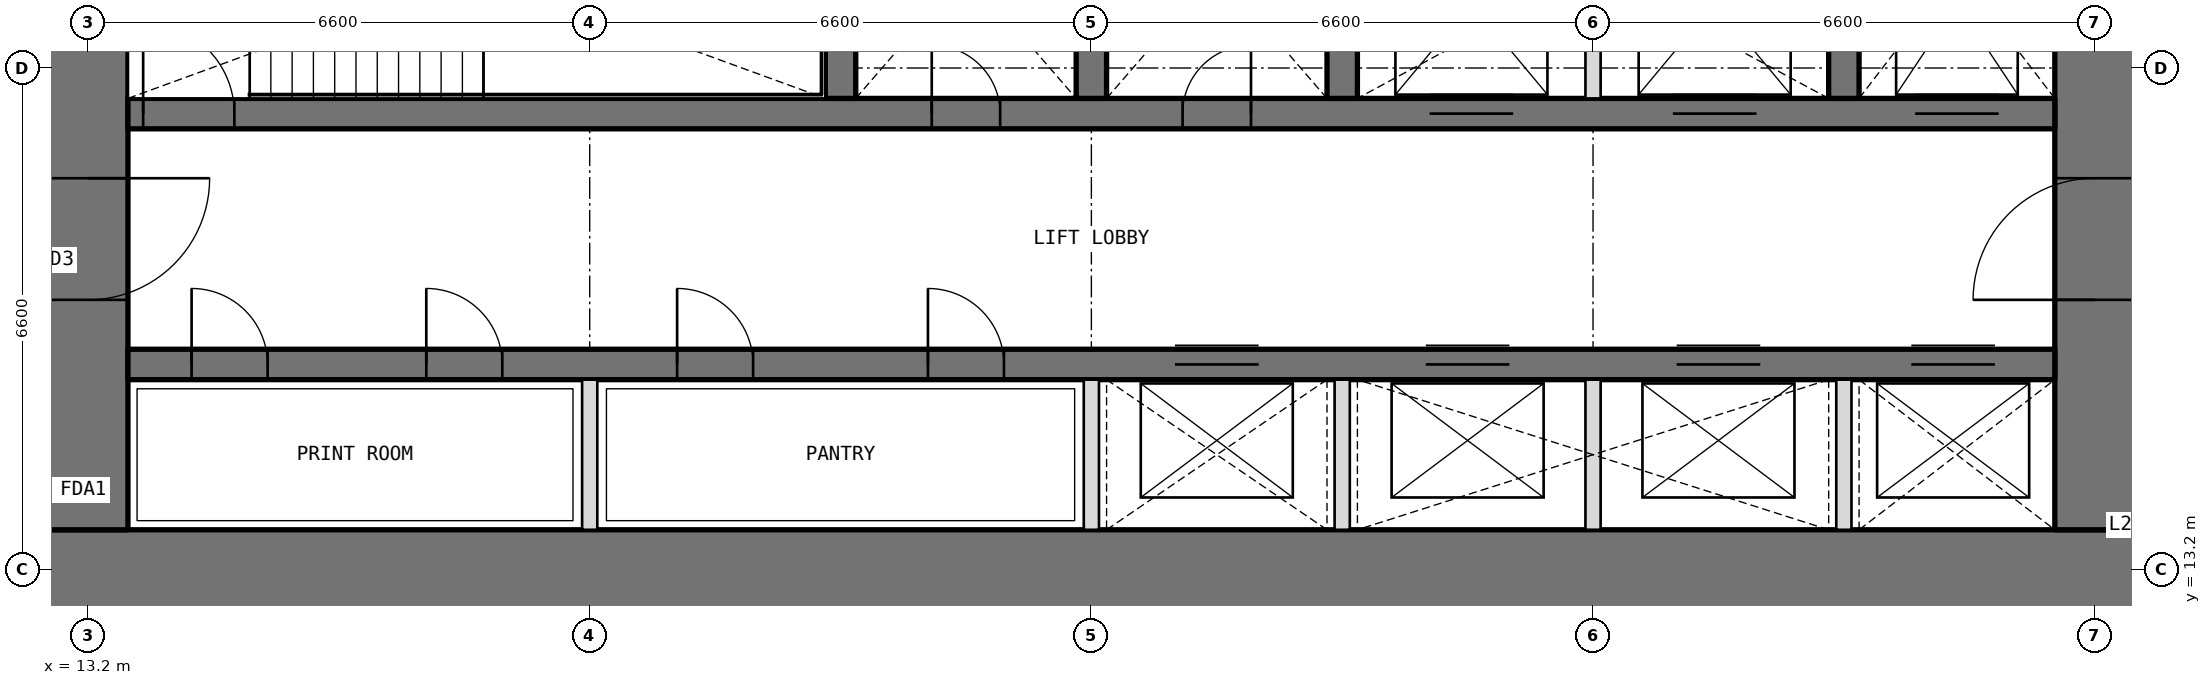
"""IFC4 building model, lengths in metres.
Left out: names, types, materials, properties, quantities, classifications, styles, units other than length and angle.
Written with IfcOpenShell. Run it as: python <this file> out.ifc"""

import sys

from ifc_helpers import new_model, si_unit, direction, frame, frame_2d, origin, place, context, subcontext, project, spatial, rectangle, extrude, element, fill, save


model = new_model("IFC4")
c1 = context("Model", 3, precision=1e-05, world=origin(), true_north=direction((0.0, 1.0)))
c2 = subcontext(c1, "Body", "Model", "MODEL_VIEW")
j1 = project(units=[si_unit("LENGTHUNIT", "METRE"), si_unit("PLANEANGLEUNIT", "RADIAN")], contexts=[c1])
p1 = place(None, origin())
s1 = spatial("IfcSite", under=j1, at=p1, CompositionType="ELEMENT")
p2 = place(p1, origin())
s2 = spatial("IfcBuilding", under=s1, at=p2, CompositionType="ELEMENT")
p3 = place(p2, frame((0.0, 0.0, 120.0)))
s3 = spatial("IfcBuildingStorey", under=s2, at=p3, CompositionType="ELEMENT", Elevation=120.0)
p4 = place(p3, frame((12.675, 13.2, 0.0), z_axis=(0.0, 0.0, 1.0), x_axis=(1.0, 0.0, 0.0)))
e1 = element("IfcWall", 1, at=p4, inside=s3, PredefinedType="SHEAR", context=c2, shape_type="SweptSolid", body=[
    extrude(rectangle(XDim=27.45, YDim=1.05, at=frame_2d((13.725, 0.0))), origin(), (0.0, 0.0, 1.0), 4.2),
])
p5 = place(p3, frame((39.6, 13.725, 0.0), z_axis=(0.0, 0.0, 1.0), x_axis=(0.0, 1.0, 0.0)))
e2 = element("IfcWall", 2, at=p5, inside=s3, PredefinedType="SHEAR", context=c2, shape_type="SweptSolid", body=[
    extrude(rectangle(XDim=18.75, YDim=1.05, at=frame_2d((9.375, 0.0))), origin(), (0.0, 0.0, 1.0), 4.2),
])
p6 = place(p5, frame((3.025, 0.0, 0.0)))
e3 = element("IfcOpeningElement", 3, at=p6, cuts=e2, PredefinedType="OPENING", context=c2, shape_type="SweptSolid", body=[
    extrude(rectangle(XDim=1.6, YDim=2.1, at=frame_2d((0.8, 1.05))), frame((0.0, 0.535, 0.0), z_axis=(0.0, -1.0, 0.0), x_axis=(1.0, 0.0, 0.0)), (0.0, 0.0, 1.0), 1.07),
])
p7 = place(p5, frame((13.825, 0.0, 0.0)))
e4 = element("IfcOpeningElement", 4, at=p7, cuts=e2, PredefinedType="OPENING", context=c2, shape_type="SweptSolid", body=[
    extrude(rectangle(XDim=1.6, YDim=2.1, at=frame_2d((0.8, 1.05))), frame((0.0, 0.535, 0.0), z_axis=(0.0, -1.0, 0.0), x_axis=(1.0, 0.0, 0.0)), (0.0, 0.0, 1.0), 1.07),
])
p8 = place(p3, frame((13.2, 32.475, 0.0), z_axis=(0.0, 0.0, 1.0), x_axis=(0.0, -1.0, 0.0)))
e5 = element("IfcWall", 5, at=p8, inside=s3, PredefinedType="SHEAR", context=c2, shape_type="SweptSolid", body=[
    extrude(rectangle(XDim=18.75, YDim=1.05, at=frame_2d((9.375, 0.0))), origin(), (0.0, 0.0, 1.0), 4.2),
])
p9 = place(p8, frame((14.125, 0.0, 0.0)))
e6 = element("IfcOpeningElement", 6, at=p9, cuts=e5, PredefinedType="OPENING", context=c2, shape_type="SweptSolid", body=[
    extrude(rectangle(XDim=1.6, YDim=2.1, at=frame_2d((0.8, 1.05))), frame((0.0, 0.535, 0.0), z_axis=(0.0, -1.0, 0.0), x_axis=(1.0, 0.0, 0.0)), (0.0, 0.0, 1.0), 1.07),
])
p10 = place(p8, frame((3.325, 0.0, 0.0)))
e7 = element("IfcOpeningElement", 7, at=p10, cuts=e5, PredefinedType="OPENING", context=c2, shape_type="SweptSolid", body=[
    extrude(rectangle(XDim=1.6, YDim=2.1, at=frame_2d((0.8, 1.05))), frame((0.0, 0.535, 0.0), z_axis=(0.0, -1.0, 0.0), x_axis=(1.0, 0.0, 0.0)), (0.0, 0.0, 1.0), 1.07),
])
p11 = place(p3, frame((13.725, 15.9, 0.0), z_axis=(0.0, 0.0, 1.0), x_axis=(1.0, 0.0, 0.0)))
e8 = element("IfcWall", 8, at=p11, inside=s3, PredefinedType="SHEAR", context=c2, shape_type="SweptSolid", body=[
    extrude(rectangle(XDim=25.35, YDim=0.4, at=frame_2d((12.675, 0.0))), origin(), (0.0, 0.0, 1.0), 4.2),
])
p12 = place(p11, frame((0.837, 0.0, 0.0)))
e9 = element("IfcOpeningElement", 9, at=p12, cuts=e8, PredefinedType="OPENING", context=c2, shape_type="SweptSolid", body=[
    extrude(rectangle(XDim=1.0, YDim=2.1, at=frame_2d((0.5, 1.05))), frame((0.0, 0.21, 0.0), z_axis=(0.0, -1.0, 0.0), x_axis=(1.0, 0.0, 0.0)), (0.0, 0.0, 1.0), 0.42),
])
p13 = place(p11, frame((3.925, 0.0, 0.0)))
e10 = element("IfcOpeningElement", 10, at=p13, cuts=e8, PredefinedType="OPENING", context=c2, shape_type="SweptSolid", body=[
    extrude(rectangle(XDim=1.0, YDim=2.1, at=frame_2d((0.5, 1.05))), frame((0.0, 0.21, 0.0), z_axis=(0.0, -1.0, 0.0), x_axis=(1.0, 0.0, 0.0)), (0.0, 0.0, 1.0), 0.42),
])
p14 = place(p11, frame((7.225, 0.0, 0.0)))
e11 = element("IfcOpeningElement", 11, at=p14, cuts=e8, PredefinedType="OPENING", context=c2, shape_type="SweptSolid", body=[
    extrude(rectangle(XDim=1.0, YDim=2.1, at=frame_2d((0.5, 1.05))), frame((0.0, 0.21, 0.0), z_axis=(0.0, -1.0, 0.0), x_axis=(1.0, 0.0, 0.0)), (0.0, 0.0, 1.0), 0.42),
])
p15 = place(p11, frame((10.525, 0.0, 0.0)))
e12 = element("IfcOpeningElement", 12, at=p15, cuts=e8, PredefinedType="OPENING", context=c2, shape_type="SweptSolid", body=[
    extrude(rectangle(XDim=1.0, YDim=2.1, at=frame_2d((0.5, 1.05))), frame((0.0, 0.21, 0.0), z_axis=(0.0, -1.0, 0.0), x_axis=(1.0, 0.0, 0.0)), (0.0, 0.0, 1.0), 0.42),
])
p16 = place(p11, frame((13.775, 0.0, 0.0)))
e13 = element("IfcOpeningElement", 13, at=p16, cuts=e8, PredefinedType="OPENING", context=c2, shape_type="SweptSolid", body=[
    extrude(rectangle(XDim=1.1, YDim=2.1, at=frame_2d((0.55, 1.05))), frame((0.0, 0.21, 0.0), z_axis=(0.0, -1.0, 0.0), x_axis=(1.0, 0.0, 0.0)), (0.0, 0.0, 1.0), 0.42),
])
p17 = place(p11, frame((17.075, 0.0, 0.0)))
e14 = element("IfcOpeningElement", 14, at=p17, cuts=e8, PredefinedType="OPENING", context=c2, shape_type="SweptSolid", body=[
    extrude(rectangle(XDim=1.1, YDim=2.1, at=frame_2d((0.55, 1.05))), frame((0.0, 0.21, 0.0), z_axis=(0.0, -1.0, 0.0), x_axis=(1.0, 0.0, 0.0)), (0.0, 0.0, 1.0), 0.42),
])
p18 = place(p11, frame((20.375, 0.0, 0.0)))
e15 = element("IfcOpeningElement", 15, at=p18, cuts=e8, PredefinedType="OPENING", context=c2, shape_type="SweptSolid", body=[
    extrude(rectangle(XDim=1.1, YDim=2.1, at=frame_2d((0.55, 1.05))), frame((0.0, 0.21, 0.0), z_axis=(0.0, -1.0, 0.0), x_axis=(1.0, 0.0, 0.0)), (0.0, 0.0, 1.0), 0.42),
])
p19 = place(p11, frame((23.462, 0.0, 0.0)))
e16 = element("IfcOpeningElement", 16, at=p19, cuts=e8, PredefinedType="OPENING", context=c2, shape_type="SweptSolid", body=[
    extrude(rectangle(XDim=1.1, YDim=2.1, at=frame_2d((0.55, 1.05))), frame((0.0, 0.21, 0.0), z_axis=(0.0, -1.0, 0.0), x_axis=(1.0, 0.0, 0.0)), (0.0, 0.0, 1.0), 0.42),
])
p20 = place(p3, frame((13.725, 19.2, 0.0), z_axis=(0.0, 0.0, 1.0), x_axis=(1.0, 0.0, 0.0)))
e17 = element("IfcWall", 17, at=p20, inside=s3, PredefinedType="SHEAR", context=c2, shape_type="SweptSolid", body=[
    extrude(rectangle(XDim=25.35, YDim=0.4, at=frame_2d((12.675, 0.0))), origin(), (0.0, 0.0, 1.0), 4.2),
])
p21 = place(p20, frame((10.575, 0.0, 0.0)))
e18 = element("IfcOpeningElement", 18, at=p21, cuts=e17, PredefinedType="OPENING", context=c2, shape_type="SweptSolid", body=[
    extrude(rectangle(XDim=0.9, YDim=2.1, at=frame_2d((0.45, 1.05))), frame((0.0, 0.21, 0.0), z_axis=(0.0, -1.0, 0.0), x_axis=(1.0, 0.0, 0.0)), (0.0, 0.0, 1.0), 0.42),
])
p22 = place(p20, frame((13.875, 0.0, 0.0)))
e19 = element("IfcOpeningElement", 19, at=p22, cuts=e17, PredefinedType="OPENING", context=c2, shape_type="SweptSolid", body=[
    extrude(rectangle(XDim=0.9, YDim=2.1, at=frame_2d((0.45, 1.05))), frame((0.0, 0.21, 0.0), z_axis=(0.0, -1.0, 0.0), x_axis=(1.0, 0.0, 0.0)), (0.0, 0.0, 1.0), 0.42),
])
p23 = place(p20, frame((0.2, 0.0, 0.0)))
e20 = element("IfcOpeningElement", 20, at=p23, cuts=e17, PredefinedType="OPENING", context=c2, shape_type="SweptSolid", body=[
    extrude(rectangle(XDim=1.2, YDim=2.1, at=frame_2d((0.6, 1.05))), frame((0.0, 0.21, 0.0), z_axis=(0.0, -1.0, 0.0), x_axis=(1.0, 0.0, 0.0)), (0.0, 0.0, 1.0), 0.42),
])
p24 = place(p20, frame((23.512, 0.0, 0.0)))
e21 = element("IfcOpeningElement", 21, at=p24, cuts=e17, PredefinedType="OPENING", context=c2, shape_type="SweptSolid", body=[
    extrude(rectangle(XDim=1.1, YDim=2.1, at=frame_2d((0.55, 1.05))), frame((0.0, 0.21, 0.0), z_axis=(0.0, -1.0, 0.0), x_axis=(1.0, 0.0, 0.0)), (0.0, 0.0, 1.0), 0.42),
])
p25 = place(p20, frame((17.125, 0.0, 0.0)))
e22 = element("IfcOpeningElement", 22, at=p25, cuts=e17, PredefinedType="OPENING", context=c2, shape_type="SweptSolid", body=[
    extrude(rectangle(XDim=1.1, YDim=2.1, at=frame_2d((0.55, 1.05))), frame((0.0, 0.21, 0.0), z_axis=(0.0, -1.0, 0.0), x_axis=(1.0, 0.0, 0.0)), (0.0, 0.0, 1.0), 0.42),
])
p26 = place(p20, frame((20.325, 0.0, 0.0)))
e23 = element("IfcOpeningElement", 23, at=p26, cuts=e17, PredefinedType="OPENING", context=c2, shape_type="SweptSolid", body=[
    extrude(rectangle(XDim=1.1, YDim=2.1, at=frame_2d((0.55, 1.05))), frame((0.0, 0.21, 0.0), z_axis=(0.0, -1.0, 0.0), x_axis=(1.0, 0.0, 0.0)), (0.0, 0.0, 1.0), 0.42),
])
for number, where, z_axis, x_axis in (
    (24, (23.1, 19.4, 0.0), (0.0, 0.0, 1.0), (0.0, 1.0, 0.0)),
    (25, (26.4, 19.4, 0.0), (0.0, 0.0, 1.0), (0.0, 1.0, 0.0)),
    (26, (29.7, 19.4, 0.0), (0.0, 0.0, 1.0), (0.0, 1.0, 0.0)),
    (27, (36.3, 19.4, 0.0), (0.0, 0.0, 1.0), (0.0, 1.0, 0.0)),
):
    element("IfcWall", number, at=place(p3, frame(where, z_axis=z_axis, x_axis=x_axis)), inside=s3, PredefinedType="SHEAR", context=c2, shape_type="SweptSolid", body=[
        extrude(rectangle(XDim=3.35, YDim=0.4, at=frame_2d((1.675, 0.0))), origin(), (0.0, 0.0, 1.0), 4.2),
    ])
for number, where, z_axis, x_axis in (
    (28, (19.8, 13.725, 0.0), (0.0, 0.0, 1.0), (0.0, 1.0, 0.0)),
    (29, (26.4, 13.725, 0.0), (0.0, 0.0, 1.0), (0.0, 1.0, 0.0)),
    (30, (29.7, 13.725, 0.0), (0.0, 0.0, 1.0), (0.0, 1.0, 0.0)),
    (31, (33.0, 13.725, 0.0), (0.0, 0.0, 1.0), (0.0, 1.0, 0.0)),
    (32, (36.3, 13.725, 0.0), (0.0, 0.0, 1.0), (0.0, 1.0, 0.0)),
):
    element("IfcWall", number, at=place(p3, frame(where, z_axis=z_axis, x_axis=x_axis)), inside=s3, PredefinedType="PARTITIONING", context=c2, shape_type="SweptSolid", body=[
        extrude(rectangle(XDim=1.975, YDim=0.2, at=frame_2d((0.987, 0.0))), origin(), (0.0, 0.0, 1.0), 4.2),
    ])
p27 = place(p3, frame((33.0, 19.4, 0.0), z_axis=(0.0, 0.0, 1.0), x_axis=(0.0, 1.0, 0.0)))
e33 = element("IfcWall", 33, at=p27, inside=s3, PredefinedType="PARTITIONING", context=c2, shape_type="SweptSolid", body=[
    extrude(rectangle(XDim=3.35, YDim=0.2, at=frame_2d((1.675, 0.0))), origin(), (0.0, 0.0, 1.0), 4.2),
])
p28 = place(p21, origin())
e34 = element("IfcDoor", 34, at=p28, inside=s3, OperationType="SINGLE_SWING_LEFT", PredefinedType="DOOR", context=c2, shape_type="SweptSolid", body=[
    extrude(rectangle(XDim=0.9, YDim=2.1, at=frame_2d((0.45, 1.05))), frame((0.0, 0.025, 0.0), z_axis=(0.0, -1.0, 0.0), x_axis=(1.0, 0.0, 0.0)), (0.0, 0.0, 1.0), 0.05),
])
fill(e18, e34)
p29 = place(p22, origin())
e35 = element("IfcDoor", 35, at=p29, inside=s3, OperationType="SINGLE_SWING_RIGHT", PredefinedType="DOOR", context=c2, shape_type="SweptSolid", body=[
    extrude(rectangle(XDim=0.9, YDim=2.1, at=frame_2d((0.45, 1.05))), frame((0.0, 0.025, 0.0), z_axis=(0.0, -1.0, 0.0), x_axis=(1.0, 0.0, 0.0)), (0.0, 0.0, 1.0), 0.05),
])
fill(e19, e35)
p30 = place(p12, origin())
e36 = element("IfcDoor", 36, at=p30, inside=s3, OperationType="SINGLE_SWING_LEFT", PredefinedType="DOOR", context=c2, shape_type="SweptSolid", body=[
    extrude(rectangle(XDim=1.0, YDim=2.1, at=frame_2d((0.5, 1.05))), frame((0.0, 0.025, 0.0), z_axis=(0.0, -1.0, 0.0), x_axis=(1.0, 0.0, 0.0)), (0.0, 0.0, 1.0), 0.05),
])
fill(e9, e36)
p31 = place(p13, origin())
e37 = element("IfcDoor", 37, at=p31, inside=s3, OperationType="SINGLE_SWING_LEFT", PredefinedType="DOOR", context=c2, shape_type="SweptSolid", body=[
    extrude(rectangle(XDim=1.0, YDim=2.1, at=frame_2d((0.5, 1.05))), frame((0.0, 0.025, 0.0), z_axis=(0.0, -1.0, 0.0), x_axis=(1.0, 0.0, 0.0)), (0.0, 0.0, 1.0), 0.05),
])
fill(e10, e37)
p32 = place(p14, origin())
e38 = element("IfcDoor", 38, at=p32, inside=s3, OperationType="SINGLE_SWING_LEFT", PredefinedType="DOOR", context=c2, shape_type="SweptSolid", body=[
    extrude(rectangle(XDim=1.0, YDim=2.1, at=frame_2d((0.5, 1.05))), frame((0.0, 0.025, 0.0), z_axis=(0.0, -1.0, 0.0), x_axis=(1.0, 0.0, 0.0)), (0.0, 0.0, 1.0), 0.05),
])
fill(e11, e38)
p33 = place(p15, origin())
e39 = element("IfcDoor", 39, at=p33, inside=s3, OperationType="SINGLE_SWING_LEFT", PredefinedType="DOOR", context=c2, shape_type="SweptSolid", body=[
    extrude(rectangle(XDim=1.0, YDim=2.1, at=frame_2d((0.5, 1.05))), frame((0.0, 0.025, 0.0), z_axis=(0.0, -1.0, 0.0), x_axis=(1.0, 0.0, 0.0)), (0.0, 0.0, 1.0), 0.05),
])
fill(e12, e39)
p34 = place(p23, origin())
e40 = element("IfcDoor", 40, at=p34, inside=s3, OperationType="SINGLE_SWING_LEFT", PredefinedType="DOOR", context=c2, shape_type="SweptSolid", body=[
    extrude(rectangle(XDim=1.2, YDim=2.1, at=frame_2d((0.6, 1.05))), frame((0.0, 0.025, 0.0), z_axis=(0.0, -1.0, 0.0), x_axis=(1.0, 0.0, 0.0)), (0.0, 0.0, 1.0), 0.05),
])
fill(e20, e40)
p35 = place(p9, origin())
e41 = element("IfcDoor", 41, at=p35, inside=s3, OperationType="DOUBLE_DOOR_DOUBLE_SWING", PredefinedType="DOOR", context=c2, shape_type="SweptSolid", body=[
    extrude(rectangle(XDim=1.6, YDim=2.1, at=frame_2d((0.8, 1.05))), frame((0.0, 0.025, 0.0), z_axis=(0.0, -1.0, 0.0), x_axis=(1.0, 0.0, 0.0)), (0.0, 0.0, 1.0), 0.05),
])
fill(e6, e41)
p36 = place(p6, origin())
e42 = element("IfcDoor", 42, at=p36, inside=s3, OperationType="DOUBLE_DOOR_DOUBLE_SWING", PredefinedType="DOOR", context=c2, shape_type="SweptSolid", body=[
    extrude(rectangle(XDim=1.6, YDim=2.1, at=frame_2d((0.8, 1.05))), frame((0.0, 0.025, 0.0), z_axis=(0.0, -1.0, 0.0), x_axis=(1.0, 0.0, 0.0)), (0.0, 0.0, 1.0), 0.05),
])
fill(e3, e42)
p37 = place(p16, origin())
e43 = element("IfcDoor", 43, at=p37, inside=s3, OperationType="DOUBLE_DOOR_SLIDING", PredefinedType="DOOR", context=c2, shape_type="SweptSolid", body=[
    extrude(rectangle(XDim=1.1, YDim=2.1, at=frame_2d((0.55, 1.05))), frame((0.0, 0.025, 0.0), z_axis=(0.0, -1.0, 0.0), x_axis=(1.0, 0.0, 0.0)), (0.0, 0.0, 1.0), 0.05),
])
fill(e13, e43)
p38 = place(p17, origin())
e44 = element("IfcDoor", 44, at=p38, inside=s3, OperationType="DOUBLE_DOOR_SLIDING", PredefinedType="DOOR", context=c2, shape_type="SweptSolid", body=[
    extrude(rectangle(XDim=1.1, YDim=2.1, at=frame_2d((0.55, 1.05))), frame((0.0, 0.025, 0.0), z_axis=(0.0, -1.0, 0.0), x_axis=(1.0, 0.0, 0.0)), (0.0, 0.0, 1.0), 0.05),
])
fill(e14, e44)
p39 = place(p18, origin())
e45 = element("IfcDoor", 45, at=p39, inside=s3, OperationType="DOUBLE_DOOR_SLIDING", PredefinedType="DOOR", context=c2, shape_type="SweptSolid", body=[
    extrude(rectangle(XDim=1.1, YDim=2.1, at=frame_2d((0.55, 1.05))), frame((0.0, 0.025, 0.0), z_axis=(0.0, -1.0, 0.0), x_axis=(1.0, 0.0, 0.0)), (0.0, 0.0, 1.0), 0.05),
])
fill(e15, e45)
p40 = place(p19, origin())
e46 = element("IfcDoor", 46, at=p40, inside=s3, OperationType="DOUBLE_DOOR_SLIDING", PredefinedType="DOOR", context=c2, shape_type="SweptSolid", body=[
    extrude(rectangle(XDim=1.1, YDim=2.1, at=frame_2d((0.55, 1.05))), frame((0.0, 0.025, 0.0), z_axis=(0.0, -1.0, 0.0), x_axis=(1.0, 0.0, 0.0)), (0.0, 0.0, 1.0), 0.05),
])
fill(e16, e46)
p41 = place(p24, origin())
e47 = element("IfcDoor", 47, at=p41, inside=s3, OperationType="DOUBLE_DOOR_SLIDING", PredefinedType="DOOR", context=c2, shape_type="SweptSolid", body=[
    extrude(rectangle(XDim=1.1, YDim=2.1, at=frame_2d((0.55, 1.05))), frame((0.0, 0.025, 0.0), z_axis=(0.0, -1.0, 0.0), x_axis=(1.0, 0.0, 0.0)), (0.0, 0.0, 1.0), 0.05),
])
fill(e21, e47)
p42 = place(p25, origin())
e48 = element("IfcDoor", 48, at=p42, inside=s3, OperationType="DOUBLE_DOOR_SLIDING", PredefinedType="DOOR", context=c2, shape_type="SweptSolid", body=[
    extrude(rectangle(XDim=1.1, YDim=2.1, at=frame_2d((0.55, 1.05))), frame((0.0, 0.025, 0.0), z_axis=(0.0, -1.0, 0.0), x_axis=(1.0, 0.0, 0.0)), (0.0, 0.0, 1.0), 0.05),
])
fill(e22, e48)
p43 = place(p26, origin())
e49 = element("IfcDoor", 49, at=p43, inside=s3, OperationType="DOUBLE_DOOR_SLIDING", PredefinedType="DOOR", context=c2, shape_type="SweptSolid", body=[
    extrude(rectangle(XDim=1.1, YDim=2.1, at=frame_2d((0.55, 1.05))), frame((0.0, 0.025, 0.0), z_axis=(0.0, -1.0, 0.0), x_axis=(1.0, 0.0, 0.0)), (0.0, 0.0, 1.0), 0.05),
])
fill(e23, e49)
save(model, sys.argv[1])
